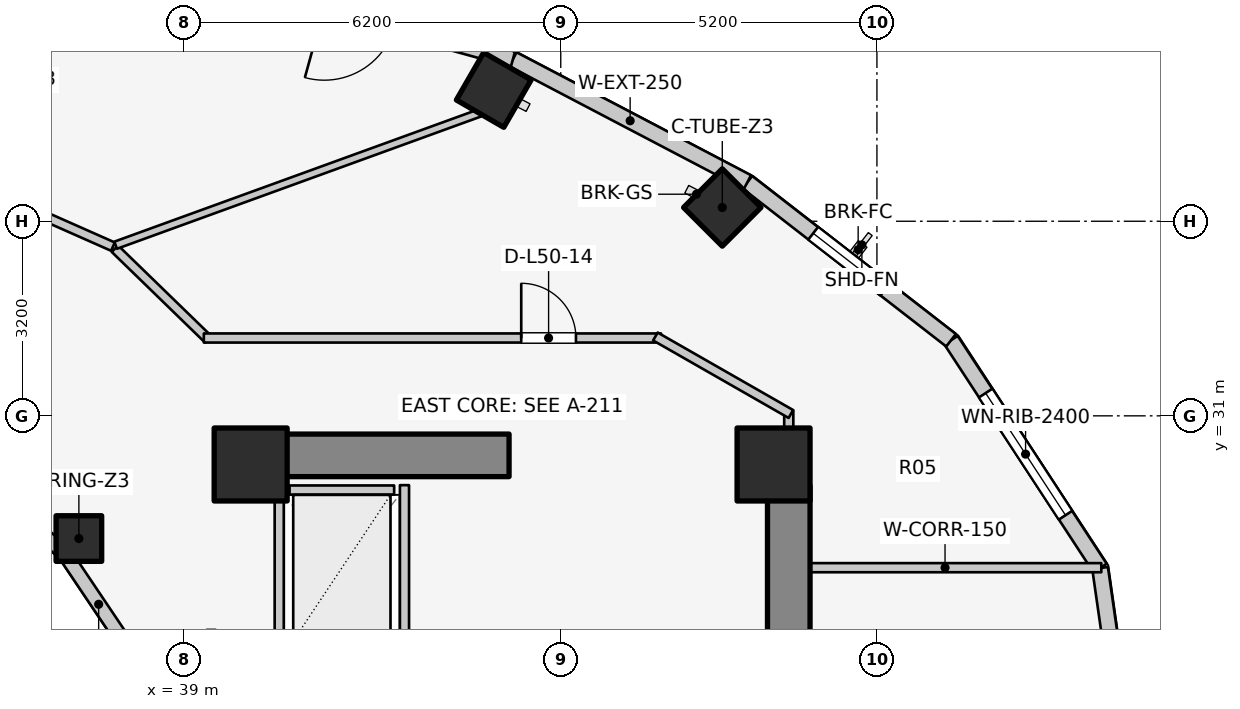
"""IFC4 building model, lengths in metres.
Left out: names, types, materials, properties, quantities, classifications, styles, units other than length and angle.
Written with IfcOpenShell. Run it as: python <this file> out.ifc"""

import sys

from ifc_helpers import new_model, si_unit, direction, frame, frame_2d, origin, origin_2d, place, context, subcontext, project, spatial, rectangle, extrude, element, fill, save


model = new_model("IFC4")
c1 = context("Model", 3, precision=1e-05, world=origin(), true_north=direction((0.0, 1.0)))
c2 = subcontext(c1, "Body", "Model", "MODEL_VIEW")
j1 = project(units=[si_unit("LENGTHUNIT", "METRE"), si_unit("PLANEANGLEUNIT", "RADIAN")], contexts=[c1])
p1 = place(None, origin())
s1 = spatial("IfcSite", under=j1, at=p1, CompositionType="ELEMENT")
p2 = place(p1, origin())
s2 = spatial("IfcBuilding", under=s1, at=p2, CompositionType="ELEMENT")
p3 = place(p2, frame((0.0, 0.0, 165.3)))
s3 = spatial("IfcBuildingStorey", under=s2, at=p3, CompositionType="ELEMENT", Elevation=165.3)
p4 = place(p3, frame((48.95, 17.05, 0.0), z_axis=(0.0, 0.0, 1.0), x_axis=(0.0, 1.0, 0.0)))
e1 = element("IfcWall", 1, at=p4, inside=s3, PredefinedType="SHEAR", context=c2, shape_type="SweptSolid", body=[
    extrude(rectangle(XDim=12.8, YDim=0.7, at=frame_2d((6.4, 0.0))), origin(), (0.0, 0.0, 1.0), 3.1),
])
p5 = place(p3, frame((39.85, 30.35, 0.0), z_axis=(0.0, 0.0, 1.0), x_axis=(1.0, 0.0, 0.0)))
e2 = element("IfcWall", 2, at=p5, inside=s3, PredefinedType="SHEAR", context=c2, shape_type="SweptSolid", body=[
    extrude(rectangle(XDim=4.5, YDim=0.7, at=frame_2d((2.25, 0.0))), origin(), (0.0, 0.0, 1.0), 3.1),
])
for number, where, z_axis, x_axis in (
    (3, (48.7, 30.2, 0.0), (0.0, 0.0, 1.0), (1.0, 0.0, 0.0)),
    (4, (40.1, 30.2, 0.0), (0.0, 0.0, 1.0), (1.0, 0.0, 0.0)),
):
    element("IfcColumn", number, at=place(p3, frame(where, z_axis=z_axis, x_axis=x_axis)), inside=s3, PredefinedType="COLUMN", context=c2, shape_type="SweptSolid", body=[
        extrude(rectangle(XDim=1.2, YDim=1.2, at=origin_2d()), origin(), (0.0, 0.0, 1.0), 3.1),
    ])
p6 = place(p3, frame((37.275, 28.982, 0.0), z_axis=(0.0, 0.0, 1.0), x_axis=(1.0, 0.0, 0.0)))
e5 = element("IfcColumn", 5, at=p6, inside=s3, PredefinedType="COLUMN", context=c2, shape_type="SweptSolid", body=[
    extrude(rectangle(XDim=0.75, YDim=0.75, at=origin_2d()), origin(), (0.0, 0.0, 1.0), 3.1),
])
for number, where, z_axis, x_axis in (
    (6, (47.857, 34.427, 0.0), (0.0, 0.0, 1.0), (0.707, 0.707, 0.0)),
    (7, (44.098, 36.359, 0.0), (0.0, 0.0, 1.0), (0.5, 0.866, 0.0)),
):
    element("IfcColumn", number, at=place(p3, frame(where, z_axis=z_axis, x_axis=x_axis)), inside=s3, PredefinedType="COLUMN", context=c2, shape_type="SweptSolid", body=[
        extrude(rectangle(XDim=0.9, YDim=0.9, at=origin_2d()), origin(), (0.0, 0.0, 1.0), 3.1),
    ])
p7 = place(p3, frame((38.166, 27.06, 0.0), z_axis=(0.0, 0.0, 1.0), x_axis=(-0.558197800898, 0.829707909492, 0.0)))
e8 = element("IfcWall", 8, at=p7, inside=s3, PredefinedType="STANDARD", context=c2, shape_type="SweptSolid", body=[
    extrude(rectangle(XDim=2.027, YDim=0.23, at=frame_2d((1.013, 0.0))), origin(), (0.0, 0.0, 1.0), 2.16),
])
p8 = place(p3, frame((37.035, 28.742, 0.0), z_axis=(0.0, 0.0, 1.0), x_axis=(-0.752576694707, 0.658504607869, 0.0)))
e9 = element("IfcWall", 9, at=p8, inside=s3, PredefinedType="STANDARD", context=c2, shape_type="SweptSolid", body=[
    extrude(rectangle(XDim=1.959, YDim=0.23, at=frame_2d((0.98, 0.0))), origin(), (0.0, 0.0, 1.0), 2.16),
])
p9 = place(p3, frame((54.86, 23.0, 0.0), z_axis=(0.0, 0.0, 1.0), x_axis=(-0.142227632286, 0.989833976288, 0.0)))
e10 = element("IfcWall", 10, at=p9, inside=s3, PredefinedType="STANDARD", context=c2, shape_type="SweptSolid", body=[
    extrude(rectangle(XDim=5.553, YDim=0.26, at=frame_2d((2.776, 0.0))), origin(), (0.0, 0.0, 1.0), 2.85),
])
p10 = place(p9, frame((2.027, 0.0, 0.75)))
e11 = element("IfcOpeningElement", 11, at=p10, cuts=e10, PredefinedType="OPENING", context=c2, shape_type="SweptSolid", body=[
    extrude(rectangle(XDim=1.5, YDim=1.6, at=frame_2d((0.75, 0.8))), frame((0.0, 0.14, 0.0), z_axis=(0.0, -1.0, 0.0), x_axis=(1.0, 0.0, 0.0)), (0.0, 0.0, 1.0), 0.28),
])
p11 = place(p3, frame((54.07, 28.497, 0.0), z_axis=(0.0, 0.0, 1.0), x_axis=(-0.547456494366, 0.836834145322, 0.0)))
e12 = element("IfcWall", 12, at=p11, inside=s3, PredefinedType="STANDARD", context=c2, shape_type="SweptSolid", body=[
    extrude(rectangle(XDim=4.477, YDim=0.26, at=frame_2d((2.239, 0.0))), origin(), (0.0, 0.0, 1.0), 2.85),
])
p12 = place(p11, frame((1.039, 0.0, 0.75)))
e13 = element("IfcOpeningElement", 13, at=p12, cuts=e12, PredefinedType="OPENING", context=c2, shape_type="SweptSolid", body=[
    extrude(rectangle(XDim=2.4, YDim=1.7, at=frame_2d((1.2, 0.85))), frame((0.0, 0.14, 0.0), z_axis=(0.0, -1.0, 0.0), x_axis=(1.0, 0.0, 0.0)), (0.0, 0.0, 1.0), 0.28),
])
p13 = place(p3, frame((51.619, 32.243, 0.0), z_axis=(0.0, 0.0, 1.0), x_axis=(-0.790185650662, 0.612867552973, 0.0)))
e14 = element("IfcWall", 14, at=p13, inside=s3, PredefinedType="STANDARD", context=c2, shape_type="SweptSolid", body=[
    extrude(rectangle(XDim=4.239, YDim=0.26, at=frame_2d((2.12, 0.0))), origin(), (0.0, 0.0, 1.0), 2.85),
])
p14 = place(p13, frame((1.37, 0.0, 0.75)))
e15 = element("IfcOpeningElement", 15, at=p14, cuts=e14, PredefinedType="OPENING", context=c2, shape_type="SweptSolid", body=[
    extrude(rectangle(XDim=1.5, YDim=1.6, at=frame_2d((0.75, 0.8))), frame((0.0, 0.14, 0.0), z_axis=(0.0, -1.0, 0.0), x_axis=(1.0, 0.0, 0.0)), (0.0, 0.0, 1.0), 0.28),
])
p15 = place(p3, frame((48.269, 34.842, 0.0), z_axis=(0.0, 0.0, 1.0), x_axis=(-0.885660265226, 0.464333818065, 0.0)))
e16 = element("IfcWall", 16, at=p15, inside=s3, PredefinedType="STANDARD", context=c2, shape_type="SweptSolid", body=[
    extrude(rectangle(XDim=4.354, YDim=0.26, at=frame_2d((2.177, 0.0))), origin(), (0.0, 0.0, 1.0), 2.85),
])
p16 = place(p3, frame((44.413, 36.863, 0.0), z_axis=(0.0, 0.0, 1.0), x_axis=(-0.963953455704, 0.26607092144, 0.0)))
e17 = element("IfcWall", 17, at=p16, inside=s3, PredefinedType="STANDARD", context=c2, shape_type="SweptSolid", body=[
    extrude(rectangle(XDim=5.237, YDim=0.26, at=frame_2d((2.618, 0.0))), origin(), (0.0, 0.0, 1.0), 2.88),
])
p17 = place(p16, frame((2.018, 0.0, 0.0)))
e18 = element("IfcOpeningElement", 18, at=p17, cuts=e17, PredefinedType="OPENING", context=c2, shape_type="SweptSolid", body=[
    extrude(rectangle(XDim=1.2, YDim=2.2, at=frame_2d((0.6, 1.1))), frame((0.0, 0.14, 0.0), z_axis=(0.0, -1.0, 0.0), x_axis=(1.0, 0.0, 0.0)), (0.0, 0.0, 1.0), 0.28),
])
p18 = place(p3, frame((40.74, 29.78, 0.0), z_axis=(0.0, 0.0, 1.0), x_axis=(1.0, 0.0, 0.0)))
e19 = element("IfcWall", 19, at=p18, inside=s3, PredefinedType="SOLIDWALL", context=c2, shape_type="SweptSolid", body=[
    extrude(rectangle(XDim=1.72, YDim=0.15, at=frame_2d((0.86, 0.0))), origin(), (0.0, 0.0, 1.0), 2.855),
])
for number, where, z_axis, x_axis in (
    (20, (40.57, 27.14, 0.0), (0.0, 0.0, 1.0), (0.0, 1.0, 0.0)),
    (21, (42.63, 27.14, 0.0), (0.0, 0.0, 1.0), (0.0, 1.0, 0.0)),
):
    element("IfcWall", number, at=place(p3, frame(where, z_axis=z_axis, x_axis=x_axis)), inside=s3, PredefinedType="SOLIDWALL", context=c2, shape_type="SweptSolid", body=[
        extrude(rectangle(XDim=2.72, YDim=0.15, at=frame_2d((1.36, 0.0))), origin(), (0.0, 0.0, 1.0), 2.855),
    ])
p19 = place(p3, frame((48.95, 28.503, 0.0), z_axis=(0.0, 0.0, 1.0), x_axis=(1.0, 0.0, 0.0)))
e22 = element("IfcWall", 22, at=p19, inside=s3, PredefinedType="PARTITIONING", context=c2, shape_type="SweptSolid", body=[
    extrude(rectangle(XDim=5.14, YDim=0.15, at=frame_2d((2.57, 0.0))), origin(), (0.0, 0.0, 1.0), 2.855),
])
p20 = place(p3, frame((48.95, 29.8, 0.0), z_axis=(0.0, 0.0, 1.0), x_axis=(0.0, 1.0, 0.0)))
e23 = element("IfcWall", 23, at=p20, inside=s3, PredefinedType="PARTITIONING", context=c2, shape_type="SweptSolid", body=[
    extrude(rectangle(XDim=1.29, YDim=0.15, at=frame_2d((0.645, 0.0))), origin(), (0.0, 0.0, 1.0), 2.855),
])
p21 = place(p3, frame((37.867, 33.749, 0.0), z_axis=(0.0, 0.0, 1.0), x_axis=(0.717419568599, -0.696641344302, 0.0)))
e24 = element("IfcWall", 24, at=p21, inside=s3, PredefinedType="PARTITIONING", context=c2, shape_type="SweptSolid", body=[
    extrude(rectangle(XDim=2.138, YDim=0.15, at=frame_2d((1.069, 0.0))), origin(), (0.0, 0.0, 1.0), 2.299),
])
p22 = place(p3, frame((39.33, 32.28, 0.0), z_axis=(0.0, 0.0, 1.0), x_axis=(1.0, 0.0, 0.0)))
e25 = element("IfcWall", 25, at=p22, inside=s3, PredefinedType="PARTITIONING", context=c2, shape_type="SweptSolid", body=[
    extrude(rectangle(XDim=7.52, YDim=0.15, at=frame_2d((3.76, 0.0))), origin(), (0.0, 0.0, 1.0), 2.299),
])
p23 = place(p22, frame((5.22, 0.0, 0.0)))
e26 = element("IfcOpeningElement", 26, at=p23, cuts=e25, PredefinedType="OPENING", context=c2, shape_type="SweptSolid", body=[
    extrude(rectangle(XDim=0.9, YDim=2.1, at=frame_2d((0.45, 1.05))), frame((0.0, 0.085, 0.0), z_axis=(0.0, -1.0, 0.0), x_axis=(1.0, 0.0, 0.0)), (0.0, 0.0, 1.0), 0.17),
])
p24 = place(p3, frame((46.757, 32.305, 0.0), z_axis=(0.0, 0.0, 1.0), x_axis=(0.867991349648, -0.496579315857, 0.0)))
e27 = element("IfcWall", 27, at=p24, inside=s3, PredefinedType="PARTITIONING", context=c2, shape_type="SweptSolid", body=[
    extrude(rectangle(XDim=2.567, YDim=0.15, at=frame_2d((1.283, 0.0))), origin(), (0.0, 0.0, 1.0), 2.22),
])
p25 = place(p3, frame((37.88, 33.806, 0.0), z_axis=(0.0, 0.0, 1.0), x_axis=(0.939901628116, 0.341445353557, 0.0)))
e28 = element("IfcWall", 28, at=p25, inside=s3, PredefinedType="PARTITIONING", context=c2, shape_type="SweptSolid", body=[
    extrude(rectangle(XDim=6.387, YDim=0.125, at=frame_2d((3.194, 0.0))), origin(), (0.0, 0.0, 1.0), 2.299),
])
p26 = place(p3, frame((37.835, 33.783, 0.0), z_axis=(0.0, 0.0, 1.0), x_axis=(-0.91445214467, 0.404694051239, 0.0)))
e29 = element("IfcWall", 29, at=p26, inside=s3, PredefinedType="PARTITIONING", context=c2, shape_type="SweptSolid", body=[
    extrude(rectangle(XDim=3.091, YDim=0.15, at=frame_2d((1.545, 0.0))), origin(), (0.0, 0.0, 1.0), 2.299),
])
p27 = place(p12, origin())
e30 = element("IfcWindow", 30, at=p27, inside=s3, PartitioningType="SINGLE_PANEL", PredefinedType="WINDOW", context=c2, shape_type="SweptSolid", body=[
    extrude(rectangle(XDim=2.4, YDim=1.7, at=frame_2d((1.2, 0.85))), frame((0.0, 0.03, 0.0), z_axis=(0.0, -1.0, 0.0), x_axis=(1.0, 0.0, 0.0)), (0.0, 0.0, 1.0), 0.06),
])
fill(e13, e30)
p28 = place(p14, origin())
e31 = element("IfcWindow", 31, at=p28, inside=s3, PartitioningType="SINGLE_PANEL", PredefinedType="WINDOW", context=c2, shape_type="SweptSolid", body=[
    extrude(rectangle(XDim=1.5, YDim=1.6, at=frame_2d((0.75, 0.8))), frame((0.0, 0.03, 0.0), z_axis=(0.0, -1.0, 0.0), x_axis=(1.0, 0.0, 0.0)), (0.0, 0.0, 1.0), 0.06),
])
fill(e15, e31)
p29 = place(p23, origin())
e32 = element("IfcDoor", 32, at=p29, inside=s3, OperationType="SINGLE_SWING_LEFT", PredefinedType="DOOR", context=c2, shape_type="SweptSolid", body=[
    extrude(rectangle(XDim=0.9, YDim=2.1, at=frame_2d((0.45, 1.05))), frame((0.0, 0.025, 0.0), z_axis=(0.0, -1.0, 0.0), x_axis=(1.0, 0.0, 0.0)), (0.0, 0.0, 1.0), 0.05),
])
fill(e26, e32)
save(model, sys.argv[1])
